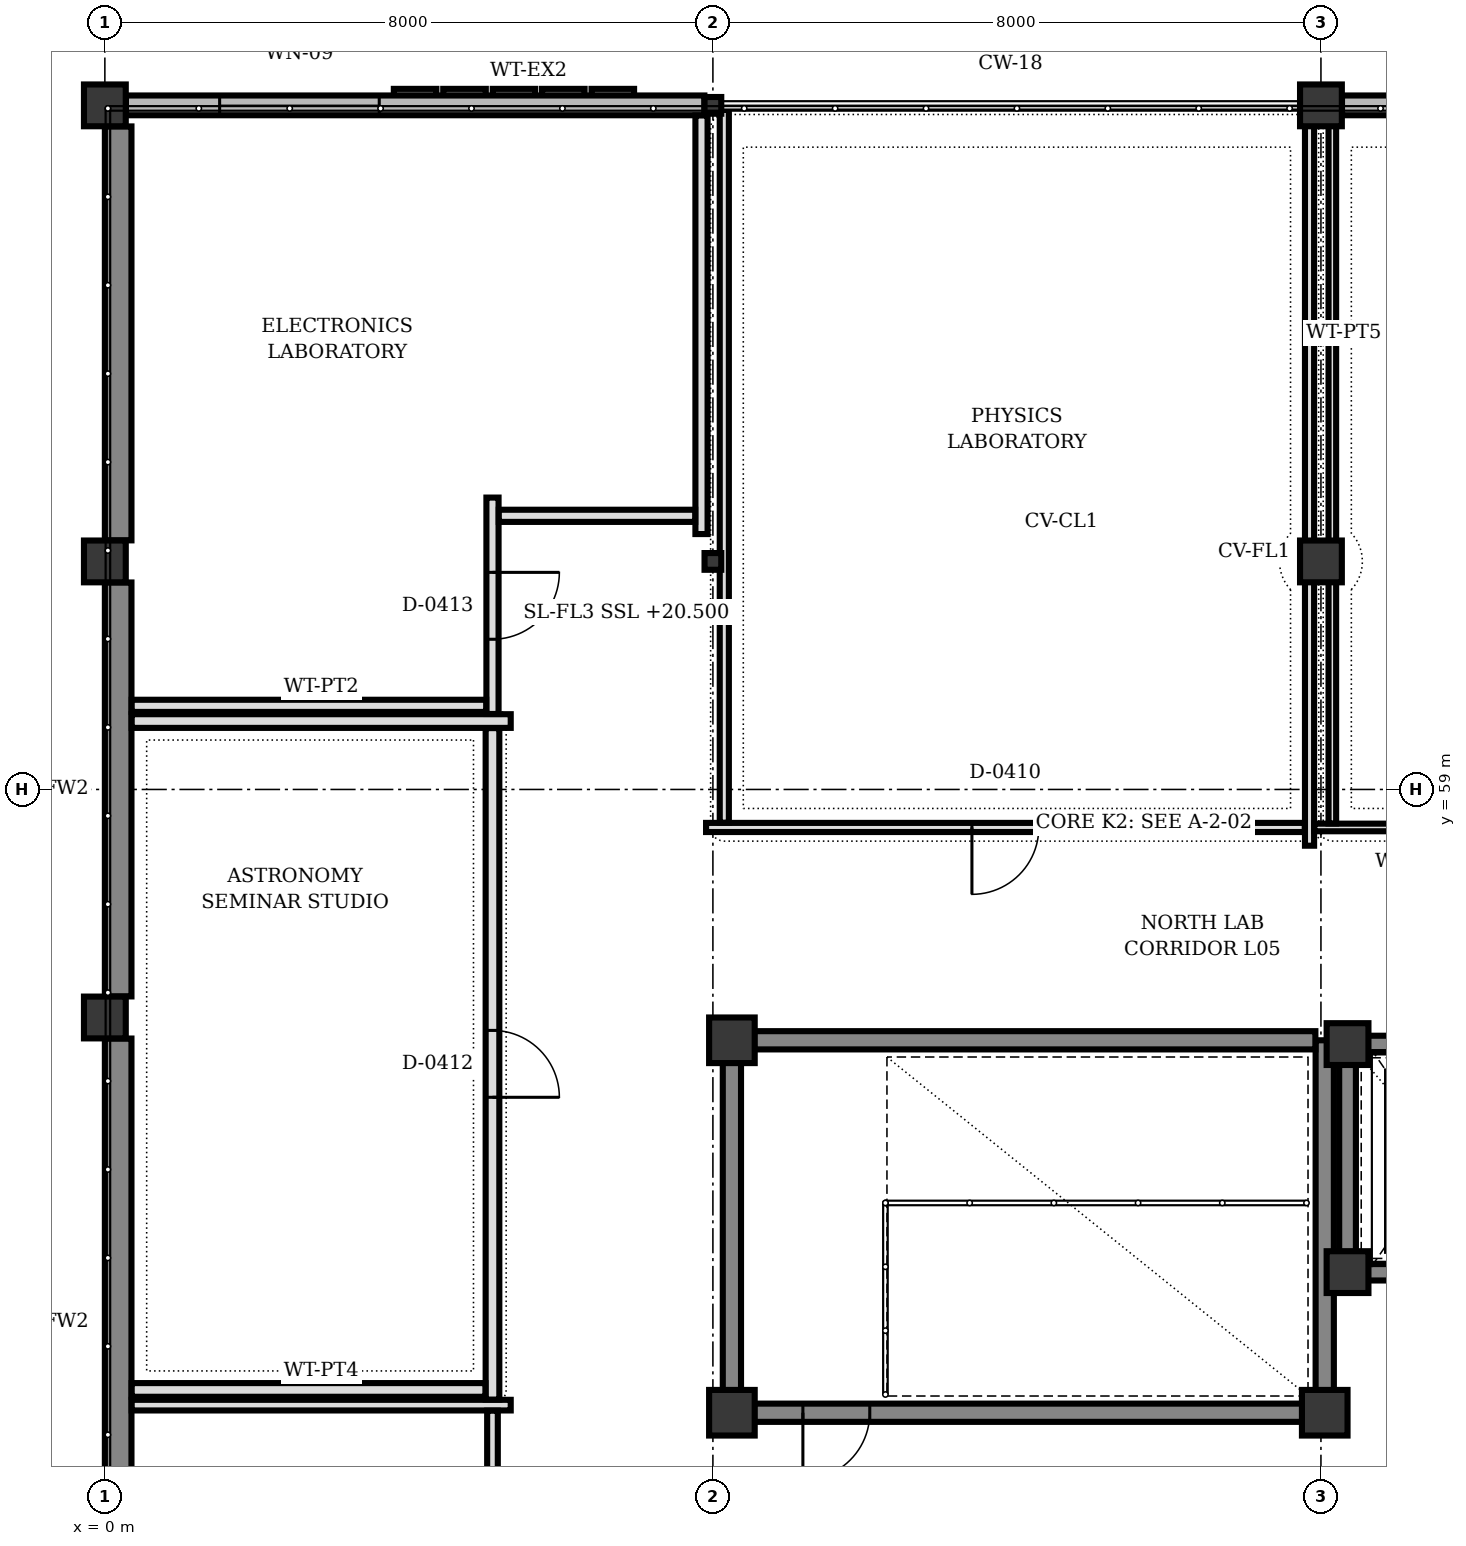
"""IFC4 building model, lengths in metres.
Left out: names, types, materials, properties, quantities, classifications, styles, units other than length and angle.
Written with IfcOpenShell. Run it as: python <this file> out.ifc"""

import sys

from ifc_helpers import new_model, si_unit, direction, frame, frame_2d, origin, origin_2d, place, context, subcontext, project, spatial, rectangle, hollow_rectangle, extrude, element, fill, save


model = new_model("IFC4")
c1 = context("Model", 3, precision=1e-05, world=origin(), true_north=direction((0.0, 1.0)))
c2 = subcontext(c1, "Body", "Model", "MODEL_VIEW")
j1 = project(units=[si_unit("LENGTHUNIT", "METRE"), si_unit("PLANEANGLEUNIT", "RADIAN")], contexts=[c1])
p1 = place(None, origin())
s1 = spatial("IfcSite", under=j1, at=p1, CompositionType="ELEMENT")
p2 = place(p1, origin())
s2 = spatial("IfcBuilding", under=s1, at=p2, CompositionType="ELEMENT")
p3 = place(p2, frame((0.0, 0.0, 20.5)))
s3 = spatial("IfcBuildingStorey", under=s2, at=p3, CompositionType="ELEMENT", Elevation=20.5)
for number, where, z_axis, x_axis in (
    (1, (8.25, 50.8, 0.0), (0.0, 0.0, 1.0), (1.0, 0.0, 0.0)),
    (2, (16.05, 50.8, 0.0), (0.0, 0.0, 1.0), (1.0, 0.0, 0.0)),
    (3, (8.25, 55.7, 0.0), (0.0, 0.0, 1.0), (1.0, 0.0, 0.0)),
):
    element("IfcColumn", number, at=place(p3, frame(where, z_axis=z_axis, x_axis=x_axis)), inside=s3, PredefinedType="COLUMN", context=c2, shape_type="SweptSolid", body=[
        extrude(rectangle(XDim=0.6, YDim=0.6, at=origin_2d()), origin(), (0.0, 0.0, 1.0), 4.0),
    ])
for number, where, z_axis, x_axis in (
    (4, (16.35, 52.65, 0.0), (0.0, 0.0, 1.0), (1.0, 0.0, 0.0)),
    (5, (16.35, 55.65, 0.0), (0.0, 0.0, 1.0), (1.0, 0.0, 0.0)),
    (6, (0.0, 56.0, 0.0), (0.0, 0.0, 1.0), (1.0, 0.0, 0.0)),
    (7, (0.0, 62.0, 0.0), (0.0, 0.0, 1.0), (1.0, 0.0, 0.0)),
    (8, (0.0, 68.0, 0.0), (0.0, 0.0, 1.0), (1.0, 0.0, 0.0)),
    (9, (16.0, 62.0, 0.0), (0.0, 0.0, 1.0), (1.0, 0.0, 0.0)),
    (10, (16.0, 68.0, 0.0), (0.0, 0.0, 1.0), (1.0, 0.0, 0.0)),
):
    element("IfcColumn", number, at=place(p3, frame(where, z_axis=z_axis, x_axis=x_axis)), inside=s3, PredefinedType="COLUMN", context=c2, shape_type="SweptSolid", body=[
        extrude(rectangle(XDim=0.55, YDim=0.55, at=origin_2d()), origin(), (0.0, 0.0, 1.0), 4.0),
    ])
for number, where, z_axis, x_axis in (
    (11, (8.0, 62.0, 0.0), (0.0, 0.0, 1.0), (1.0, 0.0, 0.0)),
    (12, (8.0, 68.0, 0.0), (0.0, 0.0, 1.0), (1.0, 0.0, 0.0)),
):
    element("IfcColumn", number, at=place(p3, frame(where, z_axis=z_axis, x_axis=x_axis)), inside=s3, PredefinedType="COLUMN", context=c2, shape_type="SweptSolid", body=[
        extrude(hollow_rectangle(XDim=0.22, YDim=0.22, WallThickness=0.01, at=origin_2d()), origin(), (0.0, 0.0, 1.0), 4.0),
    ])
p4 = place(p3, frame((0.277, 68.0, 0.0), z_axis=(0.0, 0.0, 1.0), x_axis=(1.0, 0.0, 0.0)))
e13 = element("IfcWall", 13, at=p4, inside=s3, PredefinedType="SOLIDWALL", context=c2, shape_type="SweptSolid", body=[
    extrude(rectangle(XDim=7.611, YDim=0.26, at=frame_2d((3.805, 0.0))), origin(), (0.0, 0.0, 1.0), 3.14),
])
p5 = place(p4, frame((1.233, 0.0, 0.9)))
e14 = element("IfcOpeningElement", 14, at=p5, cuts=e13, PredefinedType="OPENING", context=c2, shape_type="SweptSolid", body=[
    extrude(rectangle(XDim=2.1, YDim=1.1, at=frame_2d((1.05, 0.55))), frame((0.0, 0.14, 0.0), z_axis=(0.0, -1.0, 0.0), x_axis=(1.0, 0.0, 0.0)), (0.0, 0.0, 1.0), 0.28),
])
p6 = place(p3, frame((16.277, 68.0, 0.0), z_axis=(0.0, 0.0, 1.0), x_axis=(1.0, 0.0, 0.0)))
e15 = element("IfcWall", 15, at=p6, inside=s3, PredefinedType="SOLIDWALL", context=c2, shape_type="SweptSolid", body=[
    extrude(rectangle(XDim=7.446, YDim=0.26, at=frame_2d((3.723, 0.0))), origin(), (0.0, 0.0, 1.0), 3.14),
])
p7 = place(p6, frame((4.286, 0.0, 0.9)))
e16 = element("IfcOpeningElement", 16, at=p7, cuts=e15, PredefinedType="OPENING", context=c2, shape_type="SweptSolid", body=[
    extrude(rectangle(XDim=2.15, YDim=1.25, at=frame_2d((1.075, 0.625))), frame((0.0, 0.14, 0.0), z_axis=(0.0, -1.0, 0.0), x_axis=(1.0, 0.0, 0.0)), (0.0, 0.0, 1.0), 0.28),
])
p8 = place(p3, frame((0.175, 48.277, 0.0), z_axis=(0.0, 0.0, 1.0), x_axis=(0.0, 1.0, 0.0)))
e17 = element("IfcWall", 17, at=p8, inside=s3, PredefinedType="SHEAR", context=c2, shape_type="SweptSolid", body=[
    extrude(rectangle(XDim=7.446, YDim=0.35, at=frame_2d((3.723, 0.0))), origin(), (0.0, 0.0, 1.0), 3.435),
])
p9 = place(p3, frame((0.175, 56.277, 0.0), z_axis=(0.0, 0.0, 1.0), x_axis=(0.0, 1.0, 0.0)))
e18 = element("IfcWall", 18, at=p9, inside=s3, PredefinedType="SHEAR", context=c2, shape_type="SweptSolid", body=[
    extrude(rectangle(XDim=5.446, YDim=0.35, at=frame_2d((2.723, 0.0))), origin(), (0.0, 0.0, 1.0), 3.545),
])
p10 = place(p3, frame((0.175, 62.277, 0.0), z_axis=(0.0, 0.0, 1.0), x_axis=(0.0, 1.0, 0.0)))
e19 = element("IfcWall", 19, at=p10, inside=s3, PredefinedType="SHEAR", context=c2, shape_type="SweptSolid", body=[
    extrude(rectangle(XDim=5.446, YDim=0.35, at=frame_2d((2.723, 0.0))), origin(), (0.0, 0.0, 1.0), 3.397),
])
p11 = place(p3, frame((8.25, 51.092, 0.0), z_axis=(0.0, 0.0, 1.0), x_axis=(0.0, 1.0, 0.0)))
e20 = element("IfcWall", 20, at=p11, inside=s3, PredefinedType="SHEAR", context=c2, shape_type="SweptSolid", body=[
    extrude(rectangle(XDim=4.316, YDim=0.24, at=frame_2d((2.158, 0.0))), origin(), (0.0, 0.0, 1.0), 3.74),
])
p12 = place(p3, frame((16.05, 55.7, 0.0), z_axis=(0.0, 0.0, 1.0), x_axis=(0.0, -1.0, 0.0)))
e21 = element("IfcWall", 21, at=p12, inside=s3, PredefinedType="SHEAR", context=c2, shape_type="SweptSolid", body=[
    extrude(rectangle(XDim=4.608, YDim=0.24, at=frame_2d((2.304, 0.0))), origin(), (0.0, 0.0, 1.0), 3.74),
])
p13 = place(p3, frame((15.758, 50.8, 0.0), z_axis=(0.0, 0.0, 1.0), x_axis=(-1.0, 0.0, 0.0)))
e22 = element("IfcWall", 22, at=p13, inside=s3, PredefinedType="SHEAR", context=c2, shape_type="SweptSolid", body=[
    extrude(rectangle(XDim=7.216, YDim=0.24, at=frame_2d((3.608, 0.0))), origin(), (0.0, 0.0, 1.0), 3.74),
])
p14 = place(p13, frame((5.694, 0.0, 0.0)))
e23 = element("IfcOpeningElement", 23, at=p14, cuts=e22, PredefinedType="OPENING", context=c2, shape_type="SweptSolid", body=[
    extrude(rectangle(XDim=0.88, YDim=2.1, at=frame_2d((0.44, 1.05))), frame((0.0, 0.13, 0.0), z_axis=(0.0, -1.0, 0.0), x_axis=(1.0, 0.0, 0.0)), (0.0, 0.0, 1.0), 0.26),
])
p15 = place(p3, frame((15.927, 55.7, 0.0), z_axis=(0.0, 0.0, 1.0), x_axis=(-1.0, 0.0, 0.0)))
e24 = element("IfcWall", 24, at=p15, inside=s3, PredefinedType="SHEAR", context=c2, shape_type="SweptSolid", body=[
    extrude(rectangle(XDim=7.385, YDim=0.24, at=frame_2d((3.692, 0.0))), origin(), (0.0, 0.0, 1.0), 3.74),
])
for number, where, z_axis, x_axis in (
    (25, (16.617, 52.65, 0.0), (0.0, 0.0, 1.0), (1.0, 0.0, 0.0)),
    (26, (18.683, 55.65, 0.0), (0.0, 0.0, 1.0), (-1.0, 0.0, 0.0)),
):
    element("IfcWall", number, at=place(p3, frame(where, z_axis=z_axis, x_axis=x_axis)), inside=s3, PredefinedType="SHEAR", context=c2, shape_type="SweptSolid", body=[
        extrude(rectangle(XDim=2.066, YDim=0.22, at=frame_2d((1.033, 0.0))), origin(), (0.0, 0.0, 1.0), 3.74),
    ])
p16 = place(p3, frame((16.35, 55.383, 0.0), z_axis=(0.0, 0.0, 1.0), x_axis=(0.0, -1.0, 0.0)))
e27 = element("IfcWall", 27, at=p16, inside=s3, PredefinedType="SHEAR", context=c2, shape_type="SweptSolid", body=[
    extrude(rectangle(XDim=2.466, YDim=0.22, at=frame_2d((1.233, 0.0))), origin(), (0.0, 0.0, 1.0), 3.74),
])
p17 = place(p3, frame((0.353, 50.9, 0.0), z_axis=(0.0, 0.0, 1.0), x_axis=(1.0, 0.0, 0.0)))
e28 = element("IfcWall", 28, at=p17, inside=s3, PredefinedType="PARTITIONING", context=c2, shape_type="SweptSolid", body=[
    extrude(rectangle(XDim=4.987, YDim=0.14, at=frame_2d((2.494, 0.0))), origin(), (0.0, 0.0, 1.0), 3.7),
])
p18 = place(p3, frame((5.1, 50.827, 0.0), z_axis=(0.0, 0.0, 1.0), x_axis=(0.0, -1.0, 0.0)))
e29 = element("IfcWall", 29, at=p18, inside=s3, PredefinedType="PARTITIONING", context=c2, shape_type="SweptSolid", body=[
    extrude(rectangle(XDim=2.844, YDim=0.14, at=frame_2d((1.422, 0.0))), origin(), (0.0, 0.0, 1.0), 3.14),
])
p19 = place(p18, frame((0.982, 0.0, 0.0)))
e30 = element("IfcOpeningElement", 30, at=p19, cuts=e29, PredefinedType="OPENING", context=c2, shape_type="SweptSolid", body=[
    extrude(rectangle(XDim=0.88, YDim=2.1, at=frame_2d((0.44, 1.05))), frame((0.0, 0.08, 0.0), z_axis=(0.0, -1.0, 0.0), x_axis=(1.0, 0.0, 0.0)), (0.0, 0.0, 1.0), 0.16),
])
p20 = place(p3, frame((15.85, 67.733, 0.0), z_axis=(0.0, 0.0, 1.0), x_axis=(0.0, -1.0, 0.0)))
e31 = element("IfcWall", 31, at=p20, inside=s3, PredefinedType="PARTITIONING", context=c2, shape_type="SweptSolid", body=[
    extrude(rectangle(XDim=5.466, YDim=0.12, at=frame_2d((2.733, 0.0))), origin(), (0.0, 0.0, 1.0), 3.397),
])
p21 = place(p3, frame((15.85, 61.733, 0.0), z_axis=(0.0, 0.0, 1.0), x_axis=(0.0, -1.0, 0.0)))
e32 = element("IfcWall", 32, at=p21, inside=s3, PredefinedType="PARTITIONING", context=c2, shape_type="SweptSolid", body=[
    extrude(rectangle(XDim=3.473, YDim=0.12, at=frame_2d((1.736, 0.0))), origin(), (0.0, 0.0, 1.0), 3.7),
])
p22 = place(p3, frame((15.787, 58.5, 0.0), z_axis=(0.0, 0.0, 1.0), x_axis=(-1.0, 0.0, 0.0)))
e33 = element("IfcWall", 33, at=p22, inside=s3, PredefinedType="PARTITIONING", context=c2, shape_type="SweptSolid", body=[
    extrude(rectangle(XDim=7.877, YDim=0.12, at=frame_2d((3.938, 0.0))), origin(), (0.0, 0.0, 1.0), 3.7),
])
p23 = place(p22, frame((3.499, 0.0, 0.0)))
e34 = element("IfcOpeningElement", 34, at=p23, cuts=e33, PredefinedType="OPENING", context=c2, shape_type="SweptSolid", body=[
    extrude(rectangle(XDim=0.88, YDim=2.1, at=frame_2d((0.44, 1.05))), frame((0.0, 0.07, 0.0), z_axis=(0.0, -1.0, 0.0), x_axis=(1.0, 0.0, 0.0)), (0.0, 0.0, 1.0), 0.14),
])
p24 = place(p3, frame((8.15, 58.563, 0.0), z_axis=(0.0, 0.0, 1.0), x_axis=(0.0, 1.0, 0.0)))
e35 = element("IfcWall", 35, at=p24, inside=s3, PredefinedType="PARTITIONING", context=c2, shape_type="SweptSolid", body=[
    extrude(rectangle(XDim=9.377, YDim=0.12, at=frame_2d((4.688, 0.0))), origin(), (0.0, 0.0, 1.0), 3.14),
])
p25 = place(p3, frame((18.497, 58.5, 0.0), z_axis=(0.0, 0.0, 1.0), x_axis=(-1.0, 0.0, 0.0)))
e36 = element("IfcWall", 36, at=p25, inside=s3, PredefinedType="PARTITIONING", context=c2, shape_type="SweptSolid", body=[
    extrude(rectangle(XDim=2.584, YDim=0.1, at=frame_2d((1.292, 0.0))), origin(), (0.0, 0.0, 1.0), 3.7),
])
p26 = place(p3, frame((16.15, 58.553, 0.0), z_axis=(0.0, 0.0, 1.0), x_axis=(0.0, 1.0, 0.0)))
e37 = element("IfcWall", 37, at=p26, inside=s3, PredefinedType="PARTITIONING", context=c2, shape_type="SweptSolid", body=[
    extrude(rectangle(XDim=3.18, YDim=0.1, at=frame_2d((1.59, 0.0))), origin(), (0.0, 0.0, 1.0), 3.7),
])
p27 = place(p3, frame((16.15, 62.267, 0.0), z_axis=(0.0, 0.0, 1.0), x_axis=(0.0, 1.0, 0.0)))
e38 = element("IfcWall", 38, at=p27, inside=s3, PredefinedType="PARTITIONING", context=c2, shape_type="SweptSolid", body=[
    extrude(rectangle(XDim=5.466, YDim=0.1, at=frame_2d((2.733, 0.0))), origin(), (0.0, 0.0, 1.0), 3.397),
])
p28 = place(p3, frame((0.353, 59.9, 0.0), z_axis=(0.0, 0.0, 1.0), x_axis=(1.0, 0.0, 0.0)))
e39 = element("IfcWall", 39, at=p28, inside=s3, PredefinedType="PARTITIONING", context=c2, shape_type="SweptSolid", body=[
    extrude(rectangle(XDim=4.987, YDim=0.18, at=frame_2d((2.494, 0.0))), origin(), (0.0, 0.0, 1.0), 3.7),
])
p29 = place(p3, frame((5.1, 59.807, 0.0), z_axis=(0.0, 0.0, 1.0), x_axis=(0.0, -1.0, 0.0)))
e40 = element("IfcWall", 40, at=p29, inside=s3, PredefinedType="PARTITIONING", context=c2, shape_type="SweptSolid", body=[
    extrude(rectangle(XDim=8.834, YDim=0.18, at=frame_2d((4.417, 0.0))), origin(), (0.0, 0.0, 1.0), 3.7),
])
p30 = place(p29, frame((3.977, 0.0, 0.0)))
e41 = element("IfcOpeningElement", 41, at=p30, cuts=e40, PredefinedType="OPENING", context=c2, shape_type="SweptSolid", body=[
    extrude(rectangle(XDim=0.88, YDim=2.1, at=frame_2d((0.44, 1.05))), frame((0.0, 0.1, 0.0), z_axis=(0.0, -1.0, 0.0), x_axis=(1.0, 0.0, 0.0)), (0.0, 0.0, 1.0), 0.2),
])
p31 = place(p3, frame((5.007, 51.1, 0.0), z_axis=(0.0, 0.0, 1.0), x_axis=(-1.0, 0.0, 0.0)))
e42 = element("IfcWall", 42, at=p31, inside=s3, PredefinedType="PARTITIONING", context=c2, shape_type="SweptSolid", body=[
    extrude(rectangle(XDim=4.654, YDim=0.18, at=frame_2d((2.327, 0.0))), origin(), (0.0, 0.0, 1.0), 3.7),
])
p32 = place(p3, frame((5.1, 62.84, 0.0), z_axis=(0.0, 0.0, 1.0), x_axis=(0.0, -1.0, 0.0)))
e43 = element("IfcWall", 43, at=p32, inside=s3, PredefinedType="PARTITIONING", context=c2, shape_type="SweptSolid", body=[
    extrude(rectangle(XDim=2.847, YDim=0.16, at=frame_2d((1.424, 0.0))), origin(), (0.0, 0.0, 1.0), 3.14),
])
p33 = place(p32, frame((0.984, 0.0, 0.0)))
e44 = element("IfcOpeningElement", 44, at=p33, cuts=e43, PredefinedType="OPENING", context=c2, shape_type="SweptSolid", body=[
    extrude(rectangle(XDim=0.88, YDim=2.1, at=frame_2d((0.44, 1.05))), frame((0.0, 0.09, 0.0), z_axis=(0.0, -1.0, 0.0), x_axis=(1.0, 0.0, 0.0)), (0.0, 0.0, 1.0), 0.18),
])
p34 = place(p3, frame((5.017, 60.1, 0.0), z_axis=(0.0, 0.0, 1.0), x_axis=(-1.0, 0.0, 0.0)))
e45 = element("IfcWall", 45, at=p34, inside=s3, PredefinedType="PARTITIONING", context=c2, shape_type="SweptSolid", body=[
    extrude(rectangle(XDim=4.664, YDim=0.16, at=frame_2d((2.332, 0.0))), origin(), (0.0, 0.0, 1.0), 3.7),
])
p35 = place(p3, frame((7.85, 67.867, 0.0), z_axis=(0.0, 0.0, 1.0), x_axis=(0.0, -1.0, 0.0)))
e46 = element("IfcWall", 46, at=p35, inside=s3, PredefinedType="PARTITIONING", context=c2, shape_type="SweptSolid", body=[
    extrude(rectangle(XDim=5.507, YDim=0.16, at=frame_2d((2.753, 0.0))), origin(), (0.0, 0.0, 1.0), 3.14),
])
p36 = place(p3, frame((7.767, 62.6, 0.0), z_axis=(0.0, 0.0, 1.0), x_axis=(-1.0, 0.0, 0.0)))
e47 = element("IfcWall", 47, at=p36, inside=s3, PredefinedType="PARTITIONING", context=c2, shape_type="SweptSolid", body=[
    extrude(rectangle(XDim=2.584, YDim=0.16, at=frame_2d((1.292, 0.0))), origin(), (0.0, 0.0, 1.0), 3.397),
])
p37 = place(p5, origin())
e48 = element("IfcWindow", 48, at=p37, inside=s3, PartitioningType="SINGLE_PANEL", PredefinedType="WINDOW", context=c2, shape_type="SweptSolid", body=[
    extrude(rectangle(XDim=2.1, YDim=1.1, at=frame_2d((1.05, 0.55))), frame((0.0, 0.03, 0.0), z_axis=(0.0, -1.0, 0.0), x_axis=(1.0, 0.0, 0.0)), (0.0, 0.0, 1.0), 0.06),
])
fill(e14, e48)
p38 = place(p14, origin())
e49 = element("IfcDoor", 49, at=p38, inside=s3, OperationType="SINGLE_SWING_RIGHT", PredefinedType="DOOR", context=c2, shape_type="SweptSolid", body=[
    extrude(rectangle(XDim=0.88, YDim=2.1, at=frame_2d((0.44, 1.05))), frame((0.0, 0.025, 0.0), z_axis=(0.0, -1.0, 0.0), x_axis=(1.0, 0.0, 0.0)), (0.0, 0.0, 1.0), 0.05),
])
fill(e23, e49)
p39 = place(p23, origin())
e50 = element("IfcDoor", 50, at=p39, inside=s3, OperationType="SINGLE_SWING_RIGHT", PredefinedType="DOOR", context=c2, shape_type="SweptSolid", body=[
    extrude(rectangle(XDim=0.88, YDim=2.1, at=frame_2d((0.44, 1.05))), frame((0.0, 0.025, 0.0), z_axis=(0.0, -1.0, 0.0), x_axis=(1.0, 0.0, 0.0)), (0.0, 0.0, 1.0), 0.05),
])
fill(e34, e50)
p40 = place(p30, origin())
e51 = element("IfcDoor", 51, at=p40, inside=s3, OperationType="SINGLE_SWING_RIGHT", PredefinedType="DOOR", context=c2, shape_type="SweptSolid", body=[
    extrude(rectangle(XDim=0.88, YDim=2.1, at=frame_2d((0.44, 1.05))), frame((0.0, 0.025, 0.0), z_axis=(0.0, -1.0, 0.0), x_axis=(1.0, 0.0, 0.0)), (0.0, 0.0, 1.0), 0.05),
])
fill(e41, e51)
p41 = place(p33, origin())
e52 = element("IfcDoor", 52, at=p41, inside=s3, OperationType="SINGLE_SWING_LEFT", PredefinedType="DOOR", context=c2, shape_type="SweptSolid", body=[
    extrude(rectangle(XDim=0.88, YDim=2.1, at=frame_2d((0.44, 1.05))), frame((0.0, 0.025, 0.0), z_axis=(0.0, -1.0, 0.0), x_axis=(1.0, 0.0, 0.0)), (0.0, 0.0, 1.0), 0.05),
])
fill(e44, e52)
save(model, sys.argv[1])
